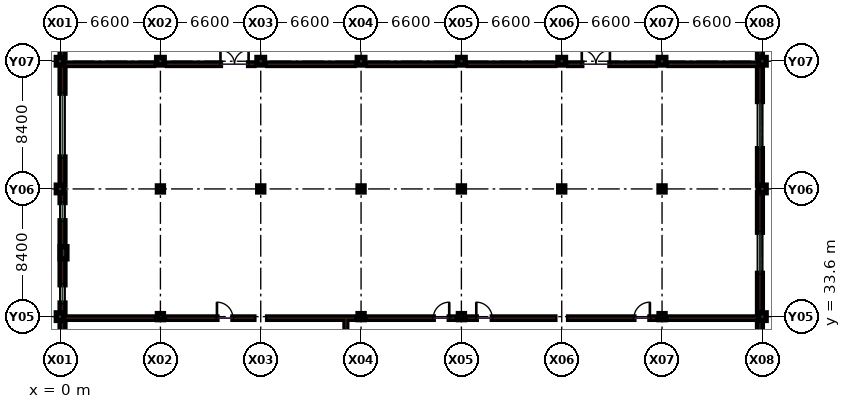
"""IFC4 building model, lengths in metres.
Left out: names, types, materials, properties, quantities, classifications, styles, units other than length and angle.
Written with IfcOpenShell. Run it as: python <this file> out.ifc"""

import sys

from ifc_helpers import new_model, si_unit, direction, frame, frame_2d, origin, origin_2d, place, context, subcontext, project, spatial, rectangle, extrude, element, fill, save


model = new_model("IFC4")
c1 = context("Model", 3, precision=1e-05, world=origin(), true_north=direction((0.0, 1.0)))
c2 = subcontext(c1, "Body", "Model", "MODEL_VIEW")
j1 = project(units=[si_unit("LENGTHUNIT", "METRE"), si_unit("PLANEANGLEUNIT", "RADIAN")], contexts=[c1])
p1 = place(None, origin())
s1 = spatial("IfcSite", under=j1, at=p1, CompositionType="ELEMENT")
p2 = place(p1, origin())
s2 = spatial("IfcBuilding", under=s1, at=p2, CompositionType="ELEMENT")
p3 = place(p2, frame((0.0, 0.0, 9.9)))
s3 = spatial("IfcBuildingStorey", under=s2, at=p3, CompositionType="ELEMENT", Elevation=9.9)
for number, where, z_axis, x_axis in (
    (1, (0.0, 33.6, 0.0), (0.0, 0.0, 1.0), (1.0, 0.0, 0.0)),
    (2, (0.0, 42.0, 0.0), (0.0, 0.0, 1.0), (1.0, 0.0, 0.0)),
    (3, (0.0, 50.4, 0.0), (0.0, 0.0, 1.0), (1.0, 0.0, 0.0)),
):
    element("IfcColumn", number, at=place(p3, frame(where, z_axis=z_axis, x_axis=x_axis)), inside=s3, PredefinedType="COLUMN", context=c2, shape_type="SweptSolid", body=[
        extrude(rectangle(XDim=0.5, YDim=0.5, at=origin_2d()), origin(), (0.0, 0.0, 1.0), 4.5),
    ])
for number, where, z_axis, x_axis in (
    (4, (6.6, 33.6, 0.0), (0.0, 0.0, 1.0), (1.0, 0.0, 0.0)),
    (5, (6.6, 42.0, 0.0), (0.0, 0.0, 1.0), (1.0, 0.0, 0.0)),
):
    element("IfcColumn", number, at=place(p3, frame(where, z_axis=z_axis, x_axis=x_axis)), inside=s3, PredefinedType="COLUMN", context=c2, shape_type="SweptSolid", body=[
        extrude(rectangle(XDim=0.4, YDim=0.4, at=origin_2d()), origin(), (0.0, 0.0, 1.0), 4.5),
    ])
p4 = place(p3, frame((6.6, 50.4, 0.0), z_axis=(0.0, 0.0, 1.0), x_axis=(1.0, 0.0, 0.0)))
e6 = element("IfcColumn", 6, at=p4, inside=s3, PredefinedType="COLUMN", context=c2, shape_type="SweptSolid", body=[
    extrude(rectangle(XDim=0.5, YDim=0.5, at=origin_2d()), origin(), (0.0, 0.0, 1.0), 4.5),
])
p5 = place(p3, frame((13.2, 42.0, 0.0), z_axis=(0.0, 0.0, 1.0), x_axis=(1.0, 0.0, 0.0)))
e7 = element("IfcColumn", 7, at=p5, inside=s3, PredefinedType="COLUMN", context=c2, shape_type="SweptSolid", body=[
    extrude(rectangle(XDim=0.4, YDim=0.4, at=origin_2d()), origin(), (0.0, 0.0, 1.0), 4.5),
])
p6 = place(p3, frame((13.2, 50.4, 0.0), z_axis=(0.0, 0.0, 1.0), x_axis=(1.0, 0.0, 0.0)))
e8 = element("IfcColumn", 8, at=p6, inside=s3, PredefinedType="COLUMN", context=c2, shape_type="SweptSolid", body=[
    extrude(rectangle(XDim=0.5, YDim=0.5, at=origin_2d()), origin(), (0.0, 0.0, 1.0), 4.5),
])
for number, where, z_axis, x_axis in (
    (9, (19.8, 33.6, 0.0), (0.0, 0.0, 1.0), (1.0, 0.0, 0.0)),
    (10, (19.8, 42.0, 0.0), (0.0, 0.0, 1.0), (1.0, 0.0, 0.0)),
):
    element("IfcColumn", number, at=place(p3, frame(where, z_axis=z_axis, x_axis=x_axis)), inside=s3, PredefinedType="COLUMN", context=c2, shape_type="SweptSolid", body=[
        extrude(rectangle(XDim=0.4, YDim=0.4, at=origin_2d()), origin(), (0.0, 0.0, 1.0), 4.5),
    ])
p7 = place(p3, frame((19.8, 50.4, 0.0), z_axis=(0.0, 0.0, 1.0), x_axis=(1.0, 0.0, 0.0)))
e11 = element("IfcColumn", 11, at=p7, inside=s3, PredefinedType="COLUMN", context=c2, shape_type="SweptSolid", body=[
    extrude(rectangle(XDim=0.5, YDim=0.5, at=origin_2d()), origin(), (0.0, 0.0, 1.0), 4.5),
])
for number, where, z_axis, x_axis in (
    (12, (26.4, 33.6, 0.0), (0.0, 0.0, 1.0), (1.0, 0.0, 0.0)),
    (13, (26.4, 42.0, 0.0), (0.0, 0.0, 1.0), (1.0, 0.0, 0.0)),
):
    element("IfcColumn", number, at=place(p3, frame(where, z_axis=z_axis, x_axis=x_axis)), inside=s3, PredefinedType="COLUMN", context=c2, shape_type="SweptSolid", body=[
        extrude(rectangle(XDim=0.4, YDim=0.4, at=origin_2d()), origin(), (0.0, 0.0, 1.0), 4.5),
    ])
p8 = place(p3, frame((26.4, 50.4, 0.0), z_axis=(0.0, 0.0, 1.0), x_axis=(1.0, 0.0, 0.0)))
e14 = element("IfcColumn", 14, at=p8, inside=s3, PredefinedType="COLUMN", context=c2, shape_type="SweptSolid", body=[
    extrude(rectangle(XDim=0.5, YDim=0.5, at=origin_2d()), origin(), (0.0, 0.0, 1.0), 4.5),
])
p9 = place(p3, frame((33.0, 42.0, 0.0), z_axis=(0.0, 0.0, 1.0), x_axis=(1.0, 0.0, 0.0)))
e15 = element("IfcColumn", 15, at=p9, inside=s3, PredefinedType="COLUMN", context=c2, shape_type="SweptSolid", body=[
    extrude(rectangle(XDim=0.4, YDim=0.4, at=origin_2d()), origin(), (0.0, 0.0, 1.0), 4.5),
])
p10 = place(p3, frame((33.0, 50.4, 0.0), z_axis=(0.0, 0.0, 1.0), x_axis=(1.0, 0.0, 0.0)))
e16 = element("IfcColumn", 16, at=p10, inside=s3, PredefinedType="COLUMN", context=c2, shape_type="SweptSolid", body=[
    extrude(rectangle(XDim=0.5, YDim=0.5, at=origin_2d()), origin(), (0.0, 0.0, 1.0), 4.5),
])
for number, where, z_axis, x_axis in (
    (17, (39.6, 33.6, 0.0), (0.0, 0.0, 1.0), (1.0, 0.0, 0.0)),
    (18, (39.6, 42.0, 0.0), (0.0, 0.0, 1.0), (1.0, 0.0, 0.0)),
):
    element("IfcColumn", number, at=place(p3, frame(where, z_axis=z_axis, x_axis=x_axis)), inside=s3, PredefinedType="COLUMN", context=c2, shape_type="SweptSolid", body=[
        extrude(rectangle(XDim=0.4, YDim=0.4, at=origin_2d()), origin(), (0.0, 0.0, 1.0), 4.5),
    ])
for number, where, z_axis, x_axis in (
    (19, (39.6, 50.4, 0.0), (0.0, 0.0, 1.0), (1.0, 0.0, 0.0)),
    (20, (46.2, 33.6, 0.0), (0.0, 0.0, 1.0), (1.0, 0.0, 0.0)),
    (21, (46.2, 42.0, 0.0), (0.0, 0.0, 1.0), (1.0, 0.0, 0.0)),
    (22, (46.2, 50.4, 0.0), (0.0, 0.0, 1.0), (1.0, 0.0, 0.0)),
):
    element("IfcColumn", number, at=place(p3, frame(where, z_axis=z_axis, x_axis=x_axis)), inside=s3, PredefinedType="COLUMN", context=c2, shape_type="SweptSolid", body=[
        extrude(rectangle(XDim=0.5, YDim=0.5, at=origin_2d()), origin(), (0.0, 0.0, 1.0), 4.5),
    ])
p11 = place(p3, frame((0.225, 37.8, 0.0), z_axis=(0.0, 0.0, 1.0), x_axis=(1.0, 0.0, 0.0)))
e23 = element("IfcColumn", 23, at=p11, inside=s3, PredefinedType="PILASTER", context=c2, shape_type="SweptSolid", body=[
    extrude(rectangle(XDim=0.45, YDim=0.8, at=origin_2d()), origin(), (0.0, 0.0, 1.0), 4.5),
])
p12 = place(p3, frame((18.8, 17.12, 0.0), z_axis=(0.0, 0.0, 1.0), x_axis=(0.0, 1.0, 0.0)))
e24 = element("IfcWall", 24, at=p12, inside=s3, PredefinedType="PARTITIONING", context=c2, shape_type="SweptSolid", body=[
    extrude(rectangle(XDim=16.38, YDim=0.12, at=frame_2d((8.19, 0.0))), origin(), (0.0, 0.0, 1.0), 3.49),
])
p13 = place(p3, frame((0.32, 33.5, 0.0), z_axis=(0.0, 0.0, 1.0), x_axis=(1.0, 0.0, 0.0)))
e25 = element("IfcWall", 25, at=p13, inside=s3, PredefinedType="PARTITIONING", context=c2, shape_type="SweptSolid", body=[
    extrude(rectangle(XDim=5.83, YDim=0.16, at=frame_2d((2.915, 0.0))), origin(), (0.0, 0.0, 1.0), 3.49),
])
p14 = place(p3, frame((7.05, 33.5, 0.0), z_axis=(0.0, 0.0, 1.0), x_axis=(1.0, 0.0, 0.0)))
e26 = element("IfcWall", 26, at=p14, inside=s3, PredefinedType="PARTITIONING", context=c2, shape_type="SweptSolid", body=[
    extrude(rectangle(XDim=5.7, YDim=0.16, at=frame_2d((2.85, 0.0))), origin(), (0.0, 0.0, 1.0), 2.925),
])
p15 = place(p14, frame((3.27, 0.0, 0.0)))
e27 = element("IfcOpeningElement", 27, at=p15, cuts=e26, PredefinedType="OPENING", context=c2, shape_type="SweptSolid", body=[
    extrude(rectangle(XDim=1.05, YDim=2.15, at=frame_2d((0.525, 1.075))), frame((0.0, 0.09, 0.0), z_axis=(0.0, -1.0, 0.0), x_axis=(1.0, 0.0, 0.0)), (0.0, 0.0, 1.0), 0.18),
])
p16 = place(p3, frame((13.65, 33.5, 0.0), z_axis=(0.0, 0.0, 1.0), x_axis=(1.0, 0.0, 0.0)))
e28 = element("IfcWall", 28, at=p16, inside=s3, PredefinedType="PARTITIONING", context=c2, shape_type="SweptSolid", body=[
    extrude(rectangle(XDim=5.7, YDim=0.16, at=frame_2d((2.85, 0.0))), origin(), (0.0, 0.0, 1.0), 2.925),
])
p17 = place(p3, frame((20.25, 33.5, 0.0), z_axis=(0.0, 0.0, 1.0), x_axis=(1.0, 0.0, 0.0)))
e29 = element("IfcWall", 29, at=p17, inside=s3, PredefinedType="PARTITIONING", context=c2, shape_type="SweptSolid", body=[
    extrude(rectangle(XDim=5.7, YDim=0.16, at=frame_2d((2.85, 0.0))), origin(), (0.0, 0.0, 1.0), 3.49),
])
p18 = place(p17, frame((4.3, 0.0, 0.0)))
e30 = element("IfcOpeningElement", 30, at=p18, cuts=e29, PredefinedType="OPENING", context=c2, shape_type="SweptSolid", body=[
    extrude(rectangle(XDim=1.05, YDim=2.15, at=frame_2d((0.525, 1.075))), frame((0.0, 0.09, 0.0), z_axis=(0.0, -1.0, 0.0), x_axis=(1.0, 0.0, 0.0)), (0.0, 0.0, 1.0), 0.18),
])
p19 = place(p3, frame((26.85, 33.5, 0.0), z_axis=(0.0, 0.0, 1.0), x_axis=(1.0, 0.0, 0.0)))
e31 = element("IfcWall", 31, at=p19, inside=s3, PredefinedType="PARTITIONING", context=c2, shape_type="SweptSolid", body=[
    extrude(rectangle(XDim=5.7, YDim=0.16, at=frame_2d((2.85, 0.0))), origin(), (0.0, 0.0, 1.0), 2.925),
])
p20 = place(p19, frame((0.53, 0.0, 0.0)))
e32 = element("IfcOpeningElement", 32, at=p20, cuts=e31, PredefinedType="OPENING", context=c2, shape_type="SweptSolid", body=[
    extrude(rectangle(XDim=1.05, YDim=2.15, at=frame_2d((0.525, 1.075))), frame((0.0, 0.09, 0.0), z_axis=(0.0, -1.0, 0.0), x_axis=(1.0, 0.0, 0.0)), (0.0, 0.0, 1.0), 0.18),
])
p21 = place(p3, frame((33.45, 33.5, 0.0), z_axis=(0.0, 0.0, 1.0), x_axis=(1.0, 0.0, 0.0)))
e33 = element("IfcWall", 33, at=p21, inside=s3, PredefinedType="PARTITIONING", context=c2, shape_type="SweptSolid", body=[
    extrude(rectangle(XDim=5.7, YDim=0.16, at=frame_2d((2.85, 0.0))), origin(), (0.0, 0.0, 1.0), 2.925),
])
p22 = place(p21, frame((4.3, 0.0, 0.0)))
e34 = element("IfcOpeningElement", 34, at=p22, cuts=e33, PredefinedType="OPENING", context=c2, shape_type="SweptSolid", body=[
    extrude(rectangle(XDim=1.05, YDim=2.15, at=frame_2d((0.525, 1.075))), frame((0.0, 0.09, 0.0), z_axis=(0.0, -1.0, 0.0), x_axis=(1.0, 0.0, 0.0)), (0.0, 0.0, 1.0), 0.18),
])
for number, where, z_axis, x_axis in (
    (35, (40.05, 33.5, 0.0), (0.0, 0.0, 1.0), (1.0, 0.0, 0.0)),
    (36, (0.32, 50.2, 0.0), (0.0, 0.0, 1.0), (1.0, 0.0, 0.0)),
):
    element("IfcWall", number, at=place(p3, frame(where, z_axis=z_axis, x_axis=x_axis)), inside=s3, PredefinedType="PARTITIONING", context=c2, shape_type="SweptSolid", body=[
        extrude(rectangle(XDim=5.83, YDim=0.16, at=frame_2d((2.915, 0.0))), origin(), (0.0, 0.0, 1.0), 3.49),
    ])
p23 = place(p3, frame((7.05, 50.2, 0.0), z_axis=(0.0, 0.0, 1.0), x_axis=(1.0, 0.0, 0.0)))
e37 = element("IfcWall", 37, at=p23, inside=s3, PredefinedType="PARTITIONING", context=c2, shape_type="SweptSolid", body=[
    extrude(rectangle(XDim=5.7, YDim=0.16, at=frame_2d((2.85, 0.0))), origin(), (0.0, 0.0, 1.0), 3.49),
])
p24 = place(p23, frame((3.5, 0.0, 0.0)))
e38 = element("IfcOpeningElement", 38, at=p24, cuts=e37, PredefinedType="OPENING", context=c2, shape_type="SweptSolid", body=[
    extrude(rectangle(XDim=1.85, YDim=2.25, at=frame_2d((0.925, 1.125))), frame((0.0, 0.09, 0.0), z_axis=(0.0, -1.0, 0.0), x_axis=(1.0, 0.0, 0.0)), (0.0, 0.0, 1.0), 0.18),
])
p25 = place(p3, frame((13.65, 50.2, 0.0), z_axis=(0.0, 0.0, 1.0), x_axis=(1.0, 0.0, 0.0)))
e39 = element("IfcWall", 39, at=p25, inside=s3, PredefinedType="PARTITIONING", context=c2, shape_type="SweptSolid", body=[
    extrude(rectangle(XDim=5.7, YDim=0.16, at=frame_2d((2.85, 0.0))), origin(), (0.0, 0.0, 1.0), 3.49),
])
for number, where, z_axis, x_axis in (
    (40, (20.25, 50.2, 0.0), (0.0, 0.0, 1.0), (1.0, 0.0, 0.0)),
    (41, (26.85, 50.2, 0.0), (0.0, 0.0, 1.0), (1.0, 0.0, 0.0)),
):
    element("IfcWall", number, at=place(p3, frame(where, z_axis=z_axis, x_axis=x_axis)), inside=s3, PredefinedType="PARTITIONING", context=c2, shape_type="SweptSolid", body=[
        extrude(rectangle(XDim=5.7, YDim=0.16, at=frame_2d((2.85, 0.0))), origin(), (0.0, 0.0, 1.0), 3.49),
    ])
p26 = place(p3, frame((33.45, 50.2, 0.0), z_axis=(0.0, 0.0, 1.0), x_axis=(1.0, 0.0, 0.0)))
e42 = element("IfcWall", 42, at=p26, inside=s3, PredefinedType="PARTITIONING", context=c2, shape_type="SweptSolid", body=[
    extrude(rectangle(XDim=5.7, YDim=0.16, at=frame_2d((2.85, 0.0))), origin(), (0.0, 0.0, 1.0), 3.49),
])
p27 = place(p26, frame((0.87, 0.0, 0.0)))
e43 = element("IfcOpeningElement", 43, at=p27, cuts=e42, PredefinedType="OPENING", context=c2, shape_type="SweptSolid", body=[
    extrude(rectangle(XDim=1.85, YDim=2.25, at=frame_2d((0.925, 1.125))), frame((0.0, 0.09, 0.0), z_axis=(0.0, -1.0, 0.0), x_axis=(1.0, 0.0, 0.0)), (0.0, 0.0, 1.0), 0.18),
])
p28 = place(p3, frame((40.05, 50.2, 0.0), z_axis=(0.0, 0.0, 1.0), x_axis=(1.0, 0.0, 0.0)))
e44 = element("IfcWall", 44, at=p28, inside=s3, PredefinedType="PARTITIONING", context=c2, shape_type="SweptSolid", body=[
    extrude(rectangle(XDim=5.83, YDim=0.16, at=frame_2d((2.915, 0.0))), origin(), (0.0, 0.0, 1.0), 3.49),
])
p29 = place(p3, frame((0.16, 33.355, 0.0), z_axis=(0.0, 0.0, 1.0), x_axis=(0.0, -1.0, 0.0)))
e45 = element("IfcWall", 45, at=p29, inside=s3, PredefinedType="SOLIDWALL", context=c2, shape_type="SweptSolid", body=[
    extrude(rectangle(XDim=7.91, YDim=0.32, at=frame_2d((3.955, 0.0))), origin(), (0.0, 0.0, 1.0), 3.625),
])
p30 = place(p29, frame((1.855, 0.0, 1.45)))
e46 = element("IfcOpeningElement", 46, at=p30, cuts=e45, PredefinedType="OPENING", context=c2, shape_type="SweptSolid", body=[
    extrude(rectangle(XDim=4.2, YDim=1.1, at=frame_2d((2.1, 0.55))), frame((0.0, 0.17, 0.0), z_axis=(0.0, -1.0, 0.0), x_axis=(1.0, 0.0, 0.0)), (0.0, 0.0, 1.0), 0.34),
])
p31 = place(p3, frame((0.16, 41.755, 0.0), z_axis=(0.0, 0.0, 1.0), x_axis=(0.0, -1.0, 0.0)))
e47 = element("IfcWall", 47, at=p31, inside=s3, PredefinedType="SOLIDWALL", context=c2, shape_type="SweptSolid", body=[
    extrude(rectangle(XDim=7.91, YDim=0.32, at=frame_2d((3.955, 0.0))), origin(), (0.0, 0.0, 1.0), 3.625),
])
p32 = place(p31, frame((0.65, 0.0, 0.95)))
e48 = element("IfcOpeningElement", 48, at=p32, cuts=e47, PredefinedType="OPENING", context=c2, shape_type="SweptSolid", body=[
    extrude(rectangle(XDim=1.2, YDim=1.5, at=frame_2d((0.6, 0.75))), frame((0.0, 0.17, 0.0), z_axis=(0.0, -1.0, 0.0), x_axis=(1.0, 0.0, 0.0)), (0.0, 0.0, 1.0), 0.34),
])
p33 = place(p31, frame((6.06, 0.0, 0.95)))
e49 = element("IfcOpeningElement", 49, at=p33, cuts=e47, PredefinedType="OPENING", context=c2, shape_type="SweptSolid", body=[
    extrude(rectangle(XDim=1.2, YDim=1.5, at=frame_2d((0.6, 0.75))), frame((0.0, 0.17, 0.0), z_axis=(0.0, -1.0, 0.0), x_axis=(1.0, 0.0, 0.0)), (0.0, 0.0, 1.0), 0.34),
])
p34 = place(p3, frame((0.16, 50.155, 0.0), z_axis=(0.0, 0.0, 1.0), x_axis=(0.0, -1.0, 0.0)))
e50 = element("IfcWall", 50, at=p34, inside=s3, PredefinedType="SOLIDWALL", context=c2, shape_type="SweptSolid", body=[
    extrude(rectangle(XDim=7.91, YDim=0.32, at=frame_2d((3.955, 0.0))), origin(), (0.0, 0.0, 1.0), 3.625),
])
p35 = place(p34, frame((1.855, 0.0, 1.45)))
e51 = element("IfcOpeningElement", 51, at=p35, cuts=e50, PredefinedType="OPENING", context=c2, shape_type="SweptSolid", body=[
    extrude(rectangle(XDim=4.2, YDim=1.1, at=frame_2d((2.1, 0.55))), frame((0.0, 0.17, 0.0), z_axis=(0.0, -1.0, 0.0), x_axis=(1.0, 0.0, 0.0)), (0.0, 0.0, 1.0), 0.34),
])
p36 = place(p3, frame((0.16, 58.555, 0.0), z_axis=(0.0, 0.0, 1.0), x_axis=(0.0, -1.0, 0.0)))
e52 = element("IfcWall", 52, at=p36, inside=s3, PredefinedType="SOLIDWALL", context=c2, shape_type="SweptSolid", body=[
    extrude(rectangle(XDim=7.91, YDim=0.32, at=frame_2d((3.955, 0.0))), origin(), (0.0, 0.0, 1.0), 3.625),
])
p37 = place(p36, frame((0.65, 0.0, 0.95)))
e53 = element("IfcOpeningElement", 53, at=p37, cuts=e52, PredefinedType="OPENING", context=c2, shape_type="SweptSolid", body=[
    extrude(rectangle(XDim=1.2, YDim=1.5, at=frame_2d((0.6, 0.75))), frame((0.0, 0.17, 0.0), z_axis=(0.0, -1.0, 0.0), x_axis=(1.0, 0.0, 0.0)), (0.0, 0.0, 1.0), 0.34),
])
p38 = place(p36, frame((6.06, 0.0, 0.95)))
e54 = element("IfcOpeningElement", 54, at=p38, cuts=e52, PredefinedType="OPENING", context=c2, shape_type="SweptSolid", body=[
    extrude(rectangle(XDim=1.2, YDim=1.5, at=frame_2d((0.6, 0.75))), frame((0.0, 0.17, 0.0), z_axis=(0.0, -1.0, 0.0), x_axis=(1.0, 0.0, 0.0)), (0.0, 0.0, 1.0), 0.34),
])
p39 = place(p3, frame((46.04, 25.445, 0.0), z_axis=(0.0, 0.0, 1.0), x_axis=(0.0, 1.0, 0.0)))
e55 = element("IfcWall", 55, at=p39, inside=s3, PredefinedType="SOLIDWALL", context=c2, shape_type="SweptSolid", body=[
    extrude(rectangle(XDim=7.91, YDim=0.32, at=frame_2d((3.955, 0.0))), origin(), (0.0, 0.0, 1.0), 3.625),
])
p40 = place(p39, frame((2.655, 0.0, 0.95)))
e56 = element("IfcOpeningElement", 56, at=p40, cuts=e55, PredefinedType="OPENING", context=c2, shape_type="SweptSolid", body=[
    extrude(rectangle(XDim=2.6, YDim=1.9, at=frame_2d((1.3, 0.95))), frame((0.0, 0.17, 0.0), z_axis=(0.0, -1.0, 0.0), x_axis=(1.0, 0.0, 0.0)), (0.0, 0.0, 1.0), 0.34),
])
p41 = place(p3, frame((46.04, 33.845, 0.0), z_axis=(0.0, 0.0, 1.0), x_axis=(0.0, 1.0, 0.0)))
e57 = element("IfcWall", 57, at=p41, inside=s3, PredefinedType="SOLIDWALL", context=c2, shape_type="SweptSolid", body=[
    extrude(rectangle(XDim=7.91, YDim=0.32, at=frame_2d((3.955, 0.0))), origin(), (0.0, 0.0, 1.0), 3.625),
])
p42 = place(p41, frame((2.605, 0.0, 0.95)))
e58 = element("IfcOpeningElement", 58, at=p42, cuts=e57, PredefinedType="OPENING", context=c2, shape_type="SweptSolid", body=[
    extrude(rectangle(XDim=2.7, YDim=2.05, at=frame_2d((1.35, 1.025))), frame((0.0, 0.17, 0.0), z_axis=(0.0, -1.0, 0.0), x_axis=(1.0, 0.0, 0.0)), (0.0, 0.0, 1.0), 0.34),
])
p43 = place(p3, frame((46.04, 42.245, 0.0), z_axis=(0.0, 0.0, 1.0), x_axis=(0.0, 1.0, 0.0)))
e59 = element("IfcWall", 59, at=p43, inside=s3, PredefinedType="SOLIDWALL", context=c2, shape_type="SweptSolid", body=[
    extrude(rectangle(XDim=7.91, YDim=0.32, at=frame_2d((3.955, 0.0))), origin(), (0.0, 0.0, 1.0), 3.625),
])
p44 = place(p43, frame((2.405, 0.0, 0.95)))
e60 = element("IfcOpeningElement", 60, at=p44, cuts=e59, PredefinedType="OPENING", context=c2, shape_type="SweptSolid", body=[
    extrude(rectangle(XDim=3.1, YDim=2.05, at=frame_2d((1.55, 1.025))), frame((0.0, 0.17, 0.0), z_axis=(0.0, -1.0, 0.0), x_axis=(1.0, 0.0, 0.0)), (0.0, 0.0, 1.0), 0.34),
])
p45 = place(p3, frame((46.04, 50.645, 0.0), z_axis=(0.0, 0.0, 1.0), x_axis=(0.0, 1.0, 0.0)))
e61 = element("IfcWall", 61, at=p45, inside=s3, PredefinedType="SOLIDWALL", context=c2, shape_type="SweptSolid", body=[
    extrude(rectangle(XDim=7.91, YDim=0.32, at=frame_2d((3.955, 0.0))), origin(), (0.0, 0.0, 1.0), 3.625),
])
p46 = place(p45, frame((3.38, 0.0, 0.95)))
e62 = element("IfcOpeningElement", 62, at=p46, cuts=e61, PredefinedType="OPENING", context=c2, shape_type="SweptSolid", body=[
    extrude(rectangle(XDim=1.15, YDim=1.6, at=frame_2d((0.575, 0.8))), frame((0.0, 0.17, 0.0), z_axis=(0.0, -1.0, 0.0), x_axis=(1.0, 0.0, 0.0)), (0.0, 0.0, 1.0), 0.34),
])
p47 = place(p15, origin())
e63 = element("IfcDoor", 63, at=p47, inside=s3, OperationType="SINGLE_SWING_LEFT", PredefinedType="DOOR", context=c2, shape_type="SweptSolid", body=[
    extrude(rectangle(XDim=1.05, YDim=2.15, at=frame_2d((0.525, 1.075))), frame((0.0, 0.025, 0.0), z_axis=(0.0, -1.0, 0.0), x_axis=(1.0, 0.0, 0.0)), (0.0, 0.0, 1.0), 0.05),
])
fill(e27, e63)
p48 = place(p18, origin())
e64 = element("IfcDoor", 64, at=p48, inside=s3, OperationType="SINGLE_SWING_RIGHT", PredefinedType="DOOR", context=c2, shape_type="SweptSolid", body=[
    extrude(rectangle(XDim=1.05, YDim=2.15, at=frame_2d((0.525, 1.075))), frame((0.0, 0.025, 0.0), z_axis=(0.0, -1.0, 0.0), x_axis=(1.0, 0.0, 0.0)), (0.0, 0.0, 1.0), 0.05),
])
fill(e30, e64)
p49 = place(p20, origin())
e65 = element("IfcDoor", 65, at=p49, inside=s3, OperationType="SINGLE_SWING_LEFT", PredefinedType="DOOR", context=c2, shape_type="SweptSolid", body=[
    extrude(rectangle(XDim=1.05, YDim=2.15, at=frame_2d((0.525, 1.075))), frame((0.0, 0.025, 0.0), z_axis=(0.0, -1.0, 0.0), x_axis=(1.0, 0.0, 0.0)), (0.0, 0.0, 1.0), 0.05),
])
fill(e32, e65)
p50 = place(p22, origin())
e66 = element("IfcDoor", 66, at=p50, inside=s3, OperationType="SINGLE_SWING_RIGHT", PredefinedType="DOOR", context=c2, shape_type="SweptSolid", body=[
    extrude(rectangle(XDim=1.05, YDim=2.15, at=frame_2d((0.525, 1.075))), frame((0.0, 0.025, 0.0), z_axis=(0.0, -1.0, 0.0), x_axis=(1.0, 0.0, 0.0)), (0.0, 0.0, 1.0), 0.05),
])
fill(e34, e66)
p51 = place(p24, origin())
e67 = element("IfcDoor", 67, at=p51, inside=s3, OperationType="DOUBLE_DOOR_SINGLE_SWING", PredefinedType="DOOR", context=c2, shape_type="SweptSolid", body=[
    extrude(rectangle(XDim=1.85, YDim=2.25, at=frame_2d((0.925, 1.125))), frame((0.0, 0.025, 0.0), z_axis=(0.0, -1.0, 0.0), x_axis=(1.0, 0.0, 0.0)), (0.0, 0.0, 1.0), 0.05),
])
fill(e38, e67)
p52 = place(p27, origin())
e68 = element("IfcDoor", 68, at=p52, inside=s3, OperationType="DOUBLE_DOOR_SINGLE_SWING", PredefinedType="DOOR", context=c2, shape_type="SweptSolid", body=[
    extrude(rectangle(XDim=1.85, YDim=2.25, at=frame_2d((0.925, 1.125))), frame((0.0, 0.025, 0.0), z_axis=(0.0, -1.0, 0.0), x_axis=(1.0, 0.0, 0.0)), (0.0, 0.0, 1.0), 0.05),
])
fill(e43, e68)
p53 = place(p32, origin())
e69 = element("IfcWindow", 69, at=p53, inside=s3, PartitioningType="SINGLE_PANEL", PredefinedType="WINDOW", context=c2, shape_type="SweptSolid", body=[
    extrude(rectangle(XDim=1.2, YDim=1.5, at=frame_2d((0.6, 0.75))), frame((0.0, 0.03, 0.0), z_axis=(0.0, -1.0, 0.0), x_axis=(1.0, 0.0, 0.0)), (0.0, 0.0, 1.0), 0.06),
])
fill(e48, e69)
p54 = place(p33, origin())
e70 = element("IfcWindow", 70, at=p54, inside=s3, PartitioningType="SINGLE_PANEL", PredefinedType="WINDOW", context=c2, shape_type="SweptSolid", body=[
    extrude(rectangle(XDim=1.2, YDim=1.5, at=frame_2d((0.6, 0.75))), frame((0.0, 0.03, 0.0), z_axis=(0.0, -1.0, 0.0), x_axis=(1.0, 0.0, 0.0)), (0.0, 0.0, 1.0), 0.06),
])
fill(e49, e70)
p55 = place(p35, origin())
e71 = element("IfcWindow", 71, at=p55, inside=s3, PartitioningType="SINGLE_PANEL", PredefinedType="WINDOW", context=c2, shape_type="SweptSolid", body=[
    extrude(rectangle(XDim=4.2, YDim=1.1, at=frame_2d((2.1, 0.55))), frame((0.0, 0.03, 0.0), z_axis=(0.0, -1.0, 0.0), x_axis=(1.0, 0.0, 0.0)), (0.0, 0.0, 1.0), 0.06),
])
fill(e51, e71)
p56 = place(p42, origin())
e72 = element("IfcWindow", 72, at=p56, inside=s3, PartitioningType="SINGLE_PANEL", PredefinedType="WINDOW", context=c2, shape_type="SweptSolid", body=[
    extrude(rectangle(XDim=2.7, YDim=2.05, at=frame_2d((1.35, 1.025))), frame((0.0, 0.03, 0.0), z_axis=(0.0, -1.0, 0.0), x_axis=(1.0, 0.0, 0.0)), (0.0, 0.0, 1.0), 0.06),
])
fill(e58, e72)
p57 = place(p44, origin())
e73 = element("IfcWindow", 73, at=p57, inside=s3, PartitioningType="SINGLE_PANEL", PredefinedType="WINDOW", context=c2, shape_type="SweptSolid", body=[
    extrude(rectangle(XDim=3.1, YDim=2.05, at=frame_2d((1.55, 1.025))), frame((0.0, 0.03, 0.0), z_axis=(0.0, -1.0, 0.0), x_axis=(1.0, 0.0, 0.0)), (0.0, 0.0, 1.0), 0.06),
])
fill(e60, e73)
save(model, sys.argv[1])
